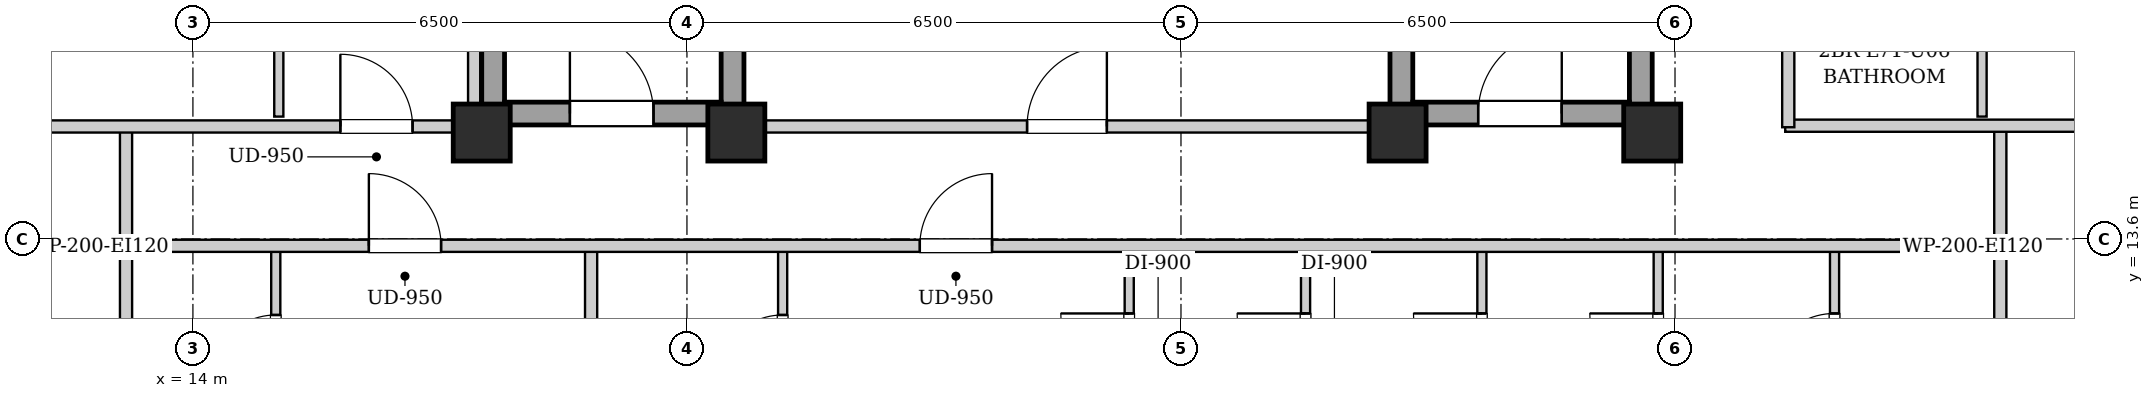
"""IFC4 building model, lengths in metres.
Left out: names, types, materials, properties, quantities, classifications, styles, units other than length and angle.
Written with IfcOpenShell. Run it as: python <this file> out.ifc"""

import sys

from ifc_helpers import new_model, si_unit, direction, frame, frame_2d, origin, origin_2d, place, context, subcontext, project, spatial, rectangle, extrude, element, fill, save


model = new_model("IFC4")
c1 = context("Model", 3, precision=1e-05, world=origin(), true_north=direction((0.0, 1.0)))
c2 = subcontext(c1, "Body", "Model", "MODEL_VIEW")
j1 = project(units=[si_unit("LENGTHUNIT", "METRE"), si_unit("PLANEANGLEUNIT", "RADIAN")], contexts=[c1])
p1 = place(None, origin())
s1 = spatial("IfcSite", under=j1, at=p1, CompositionType="ELEMENT")
p2 = place(p1, origin())
s2 = spatial("IfcBuilding", under=s1, at=p2, CompositionType="ELEMENT")
p3 = place(p2, frame((0.0, 0.0, 244.5)))
s3 = spatial("IfcBuildingStorey", under=s2, at=p3, CompositionType="ELEMENT", Elevation=244.5)
for number, where, z_axis, x_axis in (
    (1, (17.8, 15.0, 0.0), (0.0, 0.0, 1.0), (1.0, 0.0, 0.0)),
    (2, (21.15, 15.0, 0.0), (0.0, 0.0, 1.0), (1.0, 0.0, 0.0)),
    (3, (29.85, 15.0, 0.0), (0.0, 0.0, 1.0), (1.0, 0.0, 0.0)),
    (4, (33.2, 15.0, 0.0), (0.0, 0.0, 1.0), (1.0, 0.0, 0.0)),
):
    element("IfcColumn", number, at=place(p3, frame(where, z_axis=z_axis, x_axis=x_axis)), inside=s3, PredefinedType="COLUMN", context=c2, shape_type="SweptSolid", body=[
        extrude(rectangle(XDim=0.75, YDim=0.75, at=origin_2d()), origin(), (0.0, 0.0, 1.0), 3.4),
    ])
for number, where, z_axis, x_axis in (
    (5, (17.95, 15.1, 0.0), (0.0, 0.0, 1.0), (0.0, 1.0, 0.0)),
    (6, (21.1, 15.1, 0.0), (0.0, 0.0, 1.0), (0.0, 1.0, 0.0)),
):
    element("IfcWall", number, at=place(p3, frame(where, z_axis=z_axis, x_axis=x_axis)), inside=s3, PredefinedType="SHEAR", context=c2, shape_type="SweptSolid", body=[
        extrude(rectangle(XDim=9.0, YDim=0.3, at=frame_2d((4.5, 0.0))), origin(), (0.0, 0.0, 1.0), 3.14),
    ])
p4 = place(p3, frame((18.1, 15.25, 0.0), z_axis=(0.0, 0.0, 1.0), x_axis=(1.0, 0.0, 0.0)))
e7 = element("IfcWall", 7, at=p4, inside=s3, PredefinedType="SHEAR", context=c2, shape_type="SweptSolid", body=[
    extrude(rectangle(XDim=2.85, YDim=0.3, at=frame_2d((1.425, 0.0))), origin(), (0.0, 0.0, 1.0), 3.14),
])
p5 = place(p4, frame((0.86, 0.0, 0.0)))
e8 = element("IfcOpeningElement", 8, at=p5, cuts=e7, PredefinedType="OPENING", context=c2, shape_type="SweptSolid", body=[
    extrude(rectangle(XDim=1.1, YDim=2.05, at=frame_2d((0.55, 1.025))), frame((0.0, 0.16, 0.0), z_axis=(0.0, -1.0, 0.0), x_axis=(1.0, 0.0, 0.0)), (0.0, 0.0, 1.0), 0.32),
])
for number, where, z_axis, x_axis in (
    (9, (29.9, 15.1, 0.0), (0.0, 0.0, 1.0), (0.0, 1.0, 0.0)),
    (10, (33.05, 15.1, 0.0), (0.0, 0.0, 1.0), (0.0, 1.0, 0.0)),
):
    element("IfcWall", number, at=place(p3, frame(where, z_axis=z_axis, x_axis=x_axis)), inside=s3, PredefinedType="SHEAR", context=c2, shape_type="SweptSolid", body=[
        extrude(rectangle(XDim=9.0, YDim=0.3, at=frame_2d((4.5, 0.0))), origin(), (0.0, 0.0, 1.0), 3.14),
    ])
p6 = place(p3, frame((30.05, 15.25, 0.0), z_axis=(0.0, 0.0, 1.0), x_axis=(1.0, 0.0, 0.0)))
e11 = element("IfcWall", 11, at=p6, inside=s3, PredefinedType="SHEAR", context=c2, shape_type="SweptSolid", body=[
    extrude(rectangle(XDim=2.85, YDim=0.3, at=frame_2d((1.425, 0.0))), origin(), (0.0, 0.0, 1.0), 3.14),
])
p7 = place(p6, frame((0.86, 0.0, 0.0)))
e12 = element("IfcOpeningElement", 12, at=p7, cuts=e11, PredefinedType="OPENING", context=c2, shape_type="SweptSolid", body=[
    extrude(rectangle(XDim=1.1, YDim=2.05, at=frame_2d((0.55, 1.025))), frame((0.0, 0.16, 0.0), z_axis=(0.0, -1.0, 0.0), x_axis=(1.0, 0.0, 0.0)), (0.0, 0.0, 1.0), 0.32),
])
p8 = place(p3, frame((21.25, 15.08, 0.0), z_axis=(0.0, 0.0, 1.0), x_axis=(1.0, 0.0, 0.0)))
e13 = element("IfcWall", 13, at=p8, inside=s3, PredefinedType="PARTITIONING", context=c2, shape_type="SweptSolid", body=[
    extrude(rectangle(XDim=8.5, YDim=0.16, at=frame_2d((4.25, 0.0))), origin(), (0.0, 0.0, 1.0), 2.668),
])
p9 = place(p8, frame((3.725, 0.0, 0.0)))
e14 = element("IfcOpeningElement", 14, at=p9, cuts=e13, PredefinedType="OPENING", context=c2, shape_type="SweptSolid", body=[
    extrude(rectangle(XDim=1.05, YDim=2.05, at=frame_2d((0.525, 1.025))), frame((0.0, 0.09, 0.0), z_axis=(0.0, -1.0, 0.0), x_axis=(1.0, 0.0, 0.0)), (0.0, 0.0, 1.0), 0.18),
])
for number, where, z_axis, x_axis in (
    (15, (13.12, 13.51, 0.0), (0.0, 0.0, 1.0), (0.0, 1.0, 0.0)),
    (16, (37.78, 13.51, 0.0), (0.0, 0.0, 1.0), (0.0, 1.0, 0.0)),
):
    element("IfcWall", number, at=place(p3, frame(where, z_axis=z_axis, x_axis=x_axis)), inside=s3, PredefinedType="PARTITIONING", context=c2, shape_type="SweptSolid", body=[
        extrude(rectangle(XDim=1.58, YDim=0.16, at=frame_2d((0.79, 0.0))), origin(), (0.0, 0.0, 1.0), 3.14),
    ])
p10 = place(p3, frame((34.95, 15.09, 0.0), z_axis=(0.0, 0.0, 1.0), x_axis=(1.0, 0.0, 0.0)))
e17 = element("IfcWall", 17, at=p10, inside=s3, PredefinedType="PARTITIONING", context=c2, shape_type="SweptSolid", body=[
    extrude(rectangle(XDim=5.07, YDim=0.16, at=frame_2d((2.535, 0.0))), origin(), (0.0, 0.0, 1.0), 2.668),
])
p11 = place(p3, frame((13.12, 10.81, 0.0), z_axis=(0.0, 0.0, 1.0), x_axis=(0.0, 1.0, 0.0)))
e18 = element("IfcWall", 18, at=p11, inside=s3, PredefinedType="PARTITIONING", context=c2, shape_type="SweptSolid", body=[
    extrude(rectangle(XDim=2.66, YDim=0.16, at=frame_2d((1.33, 0.0))), origin(), (0.0, 0.0, 1.0), 3.14),
])
p12 = place(p3, frame((15.09, 10.87, 0.0), z_axis=(0.0, 0.0, 1.0), x_axis=(0.0, 1.0, 0.0)))
e19 = element("IfcWall", 19, at=p12, inside=s3, PredefinedType="PARTITIONING", context=c2, shape_type="SweptSolid", body=[
    extrude(rectangle(XDim=2.6, YDim=0.12, at=frame_2d((1.3, 0.0))), origin(), (0.0, 0.0, 1.0), 3.14),
])
p13 = place(p12, frame((0.87, 0.0, 0.0)))
e20 = element("IfcOpeningElement", 20, at=p13, cuts=e19, PredefinedType="OPENING", context=c2, shape_type="SweptSolid", body=[
    extrude(rectangle(XDim=0.86, YDim=2.05, at=frame_2d((0.43, 1.025))), frame((0.0, 0.07, 0.0), z_axis=(0.0, -1.0, 0.0), x_axis=(1.0, 0.0, 0.0)), (0.0, 0.0, 1.0), 0.14),
])
p14 = place(p3, frame((37.78, 10.81, 0.0), z_axis=(0.0, 0.0, 1.0), x_axis=(0.0, 1.0, 0.0)))
e21 = element("IfcWall", 21, at=p14, inside=s3, PredefinedType="PARTITIONING", context=c2, shape_type="SweptSolid", body=[
    extrude(rectangle(XDim=2.66, YDim=0.16, at=frame_2d((1.33, 0.0))), origin(), (0.0, 0.0, 1.0), 3.14),
])
p15 = place(p3, frame((19.239, 6.06, 0.0), z_axis=(0.0, 0.0, 1.0), x_axis=(0.0, 1.0, 0.0)))
e22 = element("IfcWall", 22, at=p15, inside=s3, PredefinedType="PARTITIONING", context=c2, shape_type="SweptSolid", body=[
    extrude(rectangle(XDim=7.41, YDim=0.16, at=frame_2d((3.705, 0.0))), origin(), (0.0, 0.0, 1.0), 3.14),
])
p16 = place(p3, frame((21.759, 10.87, 0.0), z_axis=(0.0, 0.0, 1.0), x_axis=(0.0, 1.0, 0.0)))
e23 = element("IfcWall", 23, at=p16, inside=s3, PredefinedType="PARTITIONING", context=c2, shape_type="SweptSolid", body=[
    extrude(rectangle(XDim=2.6, YDim=0.12, at=frame_2d((1.3, 0.0))), origin(), (0.0, 0.0, 1.0), 3.14),
])
p17 = place(p16, frame((0.87, 0.0, 0.0)))
e24 = element("IfcOpeningElement", 24, at=p17, cuts=e23, PredefinedType="OPENING", context=c2, shape_type="SweptSolid", body=[
    extrude(rectangle(XDim=0.86, YDim=2.05, at=frame_2d((0.43, 1.025))), frame((0.0, 0.07, 0.0), z_axis=(0.0, -1.0, 0.0), x_axis=(1.0, 0.0, 0.0)), (0.0, 0.0, 1.0), 0.14),
])
p18 = place(p3, frame((26.319, 10.87, 0.0), z_axis=(0.0, 0.0, 1.0), x_axis=(0.0, 1.0, 0.0)))
e25 = element("IfcWall", 25, at=p18, inside=s3, PredefinedType="PARTITIONING", context=c2, shape_type="SweptSolid", body=[
    extrude(rectangle(XDim=2.6, YDim=0.12, at=frame_2d((1.3, 0.0))), origin(), (0.0, 0.0, 1.0), 3.14),
])
p19 = place(p18, frame((0.85, 0.0, 0.0)))
e26 = element("IfcOpeningElement", 26, at=p19, cuts=e25, PredefinedType="OPENING", context=c2, shape_type="SweptSolid", body=[
    extrude(rectangle(XDim=0.9, YDim=2.05, at=frame_2d((0.45, 1.025))), frame((0.0, 0.07, 0.0), z_axis=(0.0, -1.0, 0.0), x_axis=(1.0, 0.0, 0.0)), (0.0, 0.0, 1.0), 0.14),
])
p20 = place(p3, frame((28.639, 10.87, 0.0), z_axis=(0.0, 0.0, 1.0), x_axis=(0.0, 1.0, 0.0)))
e27 = element("IfcWall", 27, at=p20, inside=s3, PredefinedType="PARTITIONING", context=c2, shape_type="SweptSolid", body=[
    extrude(rectangle(XDim=2.6, YDim=0.12, at=frame_2d((1.3, 0.0))), origin(), (0.0, 0.0, 1.0), 3.14),
])
p21 = place(p20, frame((0.85, 0.0, 0.0)))
e28 = element("IfcOpeningElement", 28, at=p21, cuts=e27, PredefinedType="OPENING", context=c2, shape_type="SweptSolid", body=[
    extrude(rectangle(XDim=0.9, YDim=2.05, at=frame_2d((0.45, 1.025))), frame((0.0, 0.07, 0.0), z_axis=(0.0, -1.0, 0.0), x_axis=(1.0, 0.0, 0.0)), (0.0, 0.0, 1.0), 0.14),
])
p22 = place(p3, frame((30.959, 10.87, 0.0), z_axis=(0.0, 0.0, 1.0), x_axis=(0.0, 1.0, 0.0)))
e29 = element("IfcWall", 29, at=p22, inside=s3, PredefinedType="PARTITIONING", context=c2, shape_type="SweptSolid", body=[
    extrude(rectangle(XDim=2.6, YDim=0.12, at=frame_2d((1.3, 0.0))), origin(), (0.0, 0.0, 1.0), 3.14),
])
p23 = place(p22, frame((0.85, 0.0, 0.0)))
e30 = element("IfcOpeningElement", 30, at=p23, cuts=e29, PredefinedType="OPENING", context=c2, shape_type="SweptSolid", body=[
    extrude(rectangle(XDim=0.9, YDim=2.05, at=frame_2d((0.45, 1.025))), frame((0.0, 0.07, 0.0), z_axis=(0.0, -1.0, 0.0), x_axis=(1.0, 0.0, 0.0)), (0.0, 0.0, 1.0), 0.14),
])
p24 = place(p3, frame((33.279, 10.87, 0.0), z_axis=(0.0, 0.0, 1.0), x_axis=(0.0, 1.0, 0.0)))
e31 = element("IfcWall", 31, at=p24, inside=s3, PredefinedType="PARTITIONING", context=c2, shape_type="SweptSolid", body=[
    extrude(rectangle(XDim=2.6, YDim=0.12, at=frame_2d((1.3, 0.0))), origin(), (0.0, 0.0, 1.0), 2.668),
])
p25 = place(p24, frame((0.85, 0.0, 0.0)))
e32 = element("IfcOpeningElement", 32, at=p25, cuts=e31, PredefinedType="OPENING", context=c2, shape_type="SweptSolid", body=[
    extrude(rectangle(XDim=0.9, YDim=2.05, at=frame_2d((0.45, 1.025))), frame((0.0, 0.07, 0.0), z_axis=(0.0, -1.0, 0.0), x_axis=(1.0, 0.0, 0.0)), (0.0, 0.0, 1.0), 0.14),
])
p26 = place(p3, frame((35.599, 10.87, 0.0), z_axis=(0.0, 0.0, 1.0), x_axis=(0.0, 1.0, 0.0)))
e33 = element("IfcWall", 33, at=p26, inside=s3, PredefinedType="PARTITIONING", context=c2, shape_type="SweptSolid", body=[
    extrude(rectangle(XDim=2.6, YDim=0.12, at=frame_2d((1.3, 0.0))), origin(), (0.0, 0.0, 1.0), 3.14),
])
p27 = place(p26, frame((0.85, 0.0, 0.0)))
e34 = element("IfcOpeningElement", 34, at=p27, cuts=e33, PredefinedType="OPENING", context=c2, shape_type="SweptSolid", body=[
    extrude(rectangle(XDim=0.9, YDim=2.05, at=frame_2d((0.45, 1.025))), frame((0.0, 0.07, 0.0), z_axis=(0.0, -1.0, 0.0), x_axis=(1.0, 0.0, 0.0)), (0.0, 0.0, 1.0), 0.14),
])
p28 = place(p3, frame((10.88, 15.08, 0.0), z_axis=(0.0, 0.0, 1.0), x_axis=(1.0, 0.0, 0.0)))
e35 = element("IfcWall", 35, at=p28, inside=s3, PredefinedType="PARTITIONING", context=c2, shape_type="SweptSolid", body=[
    extrude(rectangle(XDim=6.88, YDim=0.16, at=frame_2d((3.44, 0.0))), origin(), (0.0, 0.0, 1.0), 2.668),
])
p29 = place(p28, frame((5.06, 0.0, 0.0)))
e36 = element("IfcOpeningElement", 36, at=p29, cuts=e35, PredefinedType="OPENING", context=c2, shape_type="SweptSolid", body=[
    extrude(rectangle(XDim=0.95, YDim=2.1, at=frame_2d((0.475, 1.05))), frame((0.0, 0.09, 0.0), z_axis=(0.0, -1.0, 0.0), x_axis=(1.0, 0.0, 0.0)), (0.0, 0.0, 1.0), 0.18),
])
p30 = place(p3, frame((15.13, 15.21, 0.0), z_axis=(0.0, 0.0, 1.0), x_axis=(0.0, 1.0, 0.0)))
e37 = element("IfcWall", 37, at=p30, inside=s3, PredefinedType="PARTITIONING", context=c2, shape_type="SweptSolid", body=[
    extrude(rectangle(XDim=3.946, YDim=0.12, at=frame_2d((1.973, 0.0))), origin(), (0.0, 0.0, 1.0), 3.14),
])
p31 = place(p30, frame((1.523, 0.0, 0.0)))
e38 = element("IfcOpeningElement", 38, at=p31, cuts=e37, PredefinedType="OPENING", context=c2, shape_type="SweptSolid", body=[
    extrude(rectangle(XDim=0.9, YDim=2.05, at=frame_2d((0.45, 1.025))), frame((0.0, 0.07, 0.0), z_axis=(0.0, -1.0, 0.0), x_axis=(1.0, 0.0, 0.0)), (0.0, 0.0, 1.0), 0.14),
])
p32 = place(p3, frame((37.54, 15.21, 0.0), z_axis=(0.0, 0.0, 1.0), x_axis=(0.0, 1.0, 0.0)))
e39 = element("IfcWall", 39, at=p32, inside=s3, PredefinedType="PARTITIONING", context=c2, shape_type="SweptSolid", body=[
    extrude(rectangle(XDim=2.3, YDim=0.12, at=frame_2d((1.15, 0.0))), origin(), (0.0, 0.0, 1.0), 3.14),
])
p33 = place(p3, frame((13.15, 13.51, 0.0), z_axis=(0.0, 0.0, 1.0), x_axis=(1.0, 0.0, 0.0)))
e40 = element("IfcWall", 40, at=p33, inside=s3, PredefinedType="PARTITIONING", context=c2, shape_type="SweptSolid", body=[
    extrude(rectangle(XDim=24.6, YDim=0.16, at=frame_2d((12.3, 0.0))), origin(), (0.0, 0.0, 1.0), 3.14),
])
p34 = place(p33, frame((3.165, 0.0, 0.0)))
e41 = element("IfcOpeningElement", 41, at=p34, cuts=e40, PredefinedType="OPENING", context=c2, shape_type="SweptSolid", body=[
    extrude(rectangle(XDim=0.95, YDim=2.1, at=frame_2d((0.475, 1.05))), frame((0.0, 0.09, 0.0), z_axis=(0.0, -1.0, 0.0), x_axis=(1.0, 0.0, 0.0)), (0.0, 0.0, 1.0), 0.18),
])
p35 = place(p33, frame((10.414, 0.0, 0.0)))
e42 = element("IfcOpeningElement", 42, at=p35, cuts=e40, PredefinedType="OPENING", context=c2, shape_type="SweptSolid", body=[
    extrude(rectangle(XDim=0.95, YDim=2.1, at=frame_2d((0.475, 1.05))), frame((0.0, 0.09, 0.0), z_axis=(0.0, -1.0, 0.0), x_axis=(1.0, 0.0, 0.0)), (0.0, 0.0, 1.0), 0.18),
])
p36 = place(p3, frame((17.7, 15.02, 0.0), z_axis=(0.0, 0.0, 1.0), x_axis=(0.0, 1.0, 0.0)))
e43 = element("IfcWall", 43, at=p36, inside=s3, PredefinedType="PARTITIONING", context=c2, shape_type="SweptSolid", body=[
    extrude(rectangle(XDim=13.98, YDim=0.16, at=frame_2d((6.99, 0.0))), origin(), (0.0, 0.0, 1.0), 3.14),
])
p37 = place(p3, frame((34.99, 15.07, 0.0), z_axis=(0.0, 0.0, 1.0), x_axis=(0.0, 1.0, 0.0)))
e44 = element("IfcWall", 44, at=p37, inside=s3, PredefinedType="PARTITIONING", context=c2, shape_type="SweptSolid", body=[
    extrude(rectangle(XDim=13.93, YDim=0.16, at=frame_2d((6.965, 0.0))), origin(), (0.0, 0.0, 1.0), 3.14),
])
p38 = place(p37, frame((4.385, 0.0, 0.0)))
e45 = element("IfcOpeningElement", 45, at=p38, cuts=e44, PredefinedType="OPENING", context=c2, shape_type="SweptSolid", body=[
    extrude(rectangle(XDim=0.95, YDim=2.1, at=frame_2d((0.475, 1.05))), frame((0.0, 0.09, 0.0), z_axis=(0.0, -1.0, 0.0), x_axis=(1.0, 0.0, 0.0)), (0.0, 0.0, 1.0), 0.18),
])
p39 = place(p5, origin())
e46 = element("IfcDoor", 46, at=p39, inside=s3, OperationType="SINGLE_SWING_LEFT", PredefinedType="DOOR", context=c2, shape_type="SweptSolid", body=[
    extrude(rectangle(XDim=1.1, YDim=2.05, at=frame_2d((0.55, 1.025))), frame((0.0, 0.025, 0.0), z_axis=(0.0, -1.0, 0.0), x_axis=(1.0, 0.0, 0.0)), (0.0, 0.0, 1.0), 0.05),
])
fill(e8, e46)
p40 = place(p7, origin())
e47 = element("IfcDoor", 47, at=p40, inside=s3, OperationType="SINGLE_SWING_RIGHT", PredefinedType="DOOR", context=c2, shape_type="SweptSolid", body=[
    extrude(rectangle(XDim=1.1, YDim=2.05, at=frame_2d((0.55, 1.025))), frame((0.0, 0.025, 0.0), z_axis=(0.0, -1.0, 0.0), x_axis=(1.0, 0.0, 0.0)), (0.0, 0.0, 1.0), 0.05),
])
fill(e12, e47)
p41 = place(p9, origin())
e48 = element("IfcDoor", 48, at=p41, inside=s3, OperationType="SINGLE_SWING_RIGHT", PredefinedType="DOOR", context=c2, shape_type="SweptSolid", body=[
    extrude(rectangle(XDim=1.05, YDim=2.05, at=frame_2d((0.525, 1.025))), frame((0.0, 0.025, 0.0), z_axis=(0.0, -1.0, 0.0), x_axis=(1.0, 0.0, 0.0)), (0.0, 0.0, 1.0), 0.05),
])
fill(e14, e48)
p42 = place(p13, origin())
e49 = element("IfcDoor", 49, at=p42, inside=s3, OperationType="SINGLE_SWING_LEFT", PredefinedType="DOOR", context=c2, shape_type="SweptSolid", body=[
    extrude(rectangle(XDim=0.86, YDim=2.05, at=frame_2d((0.43, 1.025))), frame((0.0, 0.025, 0.0), z_axis=(0.0, -1.0, 0.0), x_axis=(1.0, 0.0, 0.0)), (0.0, 0.0, 1.0), 0.05),
])
fill(e20, e49)
p43 = place(p17, origin())
e50 = element("IfcDoor", 50, at=p43, inside=s3, OperationType="SINGLE_SWING_LEFT", PredefinedType="DOOR", context=c2, shape_type="SweptSolid", body=[
    extrude(rectangle(XDim=0.86, YDim=2.05, at=frame_2d((0.43, 1.025))), frame((0.0, 0.025, 0.0), z_axis=(0.0, -1.0, 0.0), x_axis=(1.0, 0.0, 0.0)), (0.0, 0.0, 1.0), 0.05),
])
fill(e24, e50)
p44 = place(p19, origin())
e51 = element("IfcDoor", 51, at=p44, inside=s3, OperationType="SINGLE_SWING_RIGHT", PredefinedType="DOOR", context=c2, shape_type="SweptSolid", body=[
    extrude(rectangle(XDim=0.9, YDim=2.05, at=frame_2d((0.45, 1.025))), frame((0.0, 0.025, 0.0), z_axis=(0.0, -1.0, 0.0), x_axis=(1.0, 0.0, 0.0)), (0.0, 0.0, 1.0), 0.05),
])
fill(e26, e51)
p45 = place(p21, origin())
e52 = element("IfcDoor", 52, at=p45, inside=s3, OperationType="SINGLE_SWING_RIGHT", PredefinedType="DOOR", context=c2, shape_type="SweptSolid", body=[
    extrude(rectangle(XDim=0.9, YDim=2.05, at=frame_2d((0.45, 1.025))), frame((0.0, 0.025, 0.0), z_axis=(0.0, -1.0, 0.0), x_axis=(1.0, 0.0, 0.0)), (0.0, 0.0, 1.0), 0.05),
])
fill(e28, e52)
p46 = place(p23, origin())
e53 = element("IfcDoor", 53, at=p46, inside=s3, OperationType="SINGLE_SWING_RIGHT", PredefinedType="DOOR", context=c2, shape_type="SweptSolid", body=[
    extrude(rectangle(XDim=0.9, YDim=2.05, at=frame_2d((0.45, 1.025))), frame((0.0, 0.025, 0.0), z_axis=(0.0, -1.0, 0.0), x_axis=(1.0, 0.0, 0.0)), (0.0, 0.0, 1.0), 0.05),
])
fill(e30, e53)
p47 = place(p25, origin())
e54 = element("IfcDoor", 54, at=p47, inside=s3, OperationType="SINGLE_SWING_RIGHT", PredefinedType="DOOR", context=c2, shape_type="SweptSolid", body=[
    extrude(rectangle(XDim=0.9, YDim=2.05, at=frame_2d((0.45, 1.025))), frame((0.0, 0.025, 0.0), z_axis=(0.0, -1.0, 0.0), x_axis=(1.0, 0.0, 0.0)), (0.0, 0.0, 1.0), 0.05),
])
fill(e32, e54)
p48 = place(p27, origin())
e55 = element("IfcDoor", 55, at=p48, inside=s3, OperationType="SINGLE_SWING_LEFT", PredefinedType="DOOR", context=c2, shape_type="SweptSolid", body=[
    extrude(rectangle(XDim=0.9, YDim=2.05, at=frame_2d((0.45, 1.025))), frame((0.0, 0.025, 0.0), z_axis=(0.0, -1.0, 0.0), x_axis=(1.0, 0.0, 0.0)), (0.0, 0.0, 1.0), 0.05),
])
fill(e34, e55)
p49 = place(p29, origin())
e56 = element("IfcDoor", 56, at=p49, inside=s3, OperationType="SINGLE_SWING_LEFT", PredefinedType="DOOR", context=c2, shape_type="SweptSolid", body=[
    extrude(rectangle(XDim=0.95, YDim=2.1, at=frame_2d((0.475, 1.05))), frame((0.0, 0.025, 0.0), z_axis=(0.0, -1.0, 0.0), x_axis=(1.0, 0.0, 0.0)), (0.0, 0.0, 1.0), 0.05),
])
fill(e36, e56)
p50 = place(p34, origin())
e57 = element("IfcDoor", 57, at=p50, inside=s3, OperationType="SINGLE_SWING_LEFT", PredefinedType="DOOR", context=c2, shape_type="SweptSolid", body=[
    extrude(rectangle(XDim=0.95, YDim=2.1, at=frame_2d((0.475, 1.05))), frame((0.0, 0.025, 0.0), z_axis=(0.0, -1.0, 0.0), x_axis=(1.0, 0.0, 0.0)), (0.0, 0.0, 1.0), 0.05),
])
fill(e41, e57)
p51 = place(p35, origin())
e58 = element("IfcDoor", 58, at=p51, inside=s3, OperationType="SINGLE_SWING_RIGHT", PredefinedType="DOOR", context=c2, shape_type="SweptSolid", body=[
    extrude(rectangle(XDim=0.95, YDim=2.1, at=frame_2d((0.475, 1.05))), frame((0.0, 0.025, 0.0), z_axis=(0.0, -1.0, 0.0), x_axis=(1.0, 0.0, 0.0)), (0.0, 0.0, 1.0), 0.05),
])
fill(e42, e58)
save(model, sys.argv[1])
